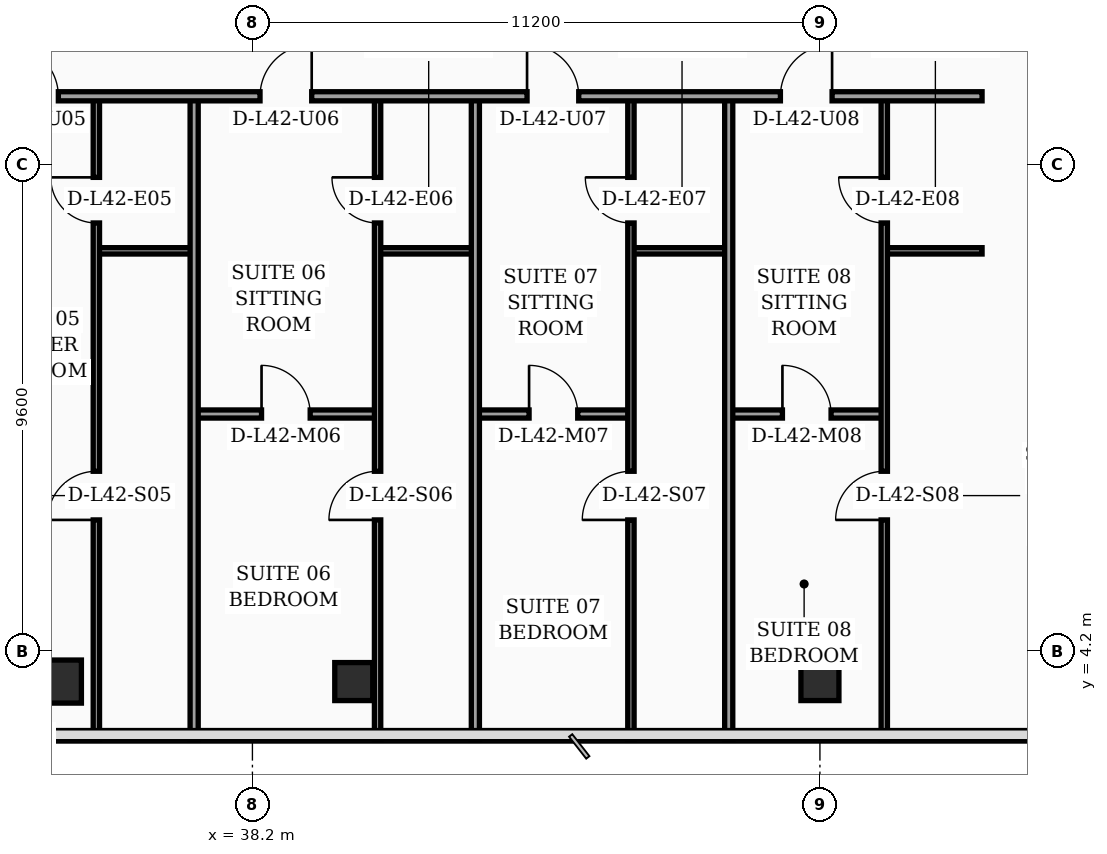
"""IFC4 building model, lengths in metres.
Left out: names, types, materials, properties, quantities, classifications, styles, units other than length and angle.
Written with IfcOpenShell. Run it as: python <this file> out.ifc"""

import sys

from ifc_helpers import new_model, si_unit, direction, frame, frame_2d, origin, origin_2d, place, context, subcontext, project, spatial, rectangle, hollow_rectangle, extrude, element, fill, save


model = new_model("IFC4")
c1 = context("Model", 3, precision=1e-05, world=origin(), true_north=direction((0.0, 1.0)))
c2 = subcontext(c1, "Body", "Model", "MODEL_VIEW")
j1 = project(units=[si_unit("LENGTHUNIT", "METRE"), si_unit("PLANEANGLEUNIT", "RADIAN")], contexts=[c1])
p1 = place(None, origin())
s1 = spatial("IfcSite", under=j1, at=p1, CompositionType="ELEMENT")
p2 = place(p1, origin())
s2 = spatial("IfcBuilding", under=s1, at=p2, CompositionType="ELEMENT")
p3 = place(p2, frame((0.0, 0.0, 171.3)))
s3 = spatial("IfcBuildingStorey", under=s2, at=p3, CompositionType="ELEMENT", Elevation=171.3)
p4 = place(p3, frame((34.4, 3.6, 0.0), z_axis=(0.0, 0.0, 1.0), x_axis=(1.0, 0.0, 0.0)))
e1 = element("IfcColumn", 1, at=p4, inside=s3, PredefinedType="COLUMN", context=c2, shape_type="SweptSolid", body=[
    extrude(hollow_rectangle(XDim=0.85, YDim=0.85, WallThickness=0.036, at=origin_2d()), origin(), (0.0, 0.0, 1.0), 3.56),
])
for number, where, z_axis, x_axis in (
    (2, (40.2, 3.6, 0.0), (0.0, 0.0, 1.0), (1.0, 0.0, 0.0)),
    (3, (49.4, 3.6, 0.0), (0.0, 0.0, 1.0), (1.0, 0.0, 0.0)),
):
    element("IfcColumn", number, at=place(p3, frame(where, z_axis=z_axis, x_axis=x_axis)), inside=s3, PredefinedType="COLUMN", context=c2, shape_type="SweptSolid", body=[
        extrude(hollow_rectangle(XDim=0.75, YDim=0.75, WallThickness=0.032, at=origin_2d()), origin(), (0.0, 0.0, 1.0), 3.56),
    ])
p5 = place(p3, frame((59.23, 5.505, 0.0), z_axis=(0.0, 0.0, 1.0), x_axis=(-0.300509063924, 0.953778958931, 0.0)))
e4 = element("IfcWall", 4, at=p5, inside=s3, PredefinedType="SOLIDWALL", context=c2, shape_type="SweptSolid", body=[
    extrude(rectangle(XDim=30.814, YDim=0.32, at=frame_2d((15.407, 0.0))), origin(), (0.0, 0.0, 1.0), 3.56),
])
p6 = place(p5, frame((4.747, 0.0, 0.0)))
e5 = element("IfcOpeningElement", 5, at=p6, cuts=e4, PredefinedType="OPENING", context=c2, shape_type="SweptSolid", body=[
    extrude(rectangle(XDim=1.4, YDim=2.25, at=frame_2d((0.7, 1.125))), frame((0.0, 0.17, 0.0), z_axis=(0.0, -1.0, 0.0), x_axis=(1.0, 0.0, 0.0)), (0.0, 0.0, 1.0), 0.34),
])
p7 = place(p5, frame((1.6, 0.0, 0.75)))
e6 = element("IfcOpeningElement", 6, at=p7, cuts=e4, PredefinedType="OPENING", context=c2, shape_type="SweptSolid", body=[
    extrude(rectangle(XDim=1.5, YDim=1.6, at=frame_2d((0.75, 0.8))), frame((0.0, 0.17, 0.0), z_axis=(0.0, -1.0, 0.0), x_axis=(1.0, 0.0, 0.0)), (0.0, 0.0, 1.0), 0.34),
])
p8 = place(p5, frame((7.8, 0.0, 0.75)))
e7 = element("IfcOpeningElement", 7, at=p8, cuts=e4, PredefinedType="OPENING", context=c2, shape_type="SweptSolid", body=[
    extrude(rectangle(XDim=1.5, YDim=1.6, at=frame_2d((0.75, 0.8))), frame((0.0, 0.17, 0.0), z_axis=(0.0, -1.0, 0.0), x_axis=(1.0, 0.0, 0.0)), (0.0, 0.0, 1.0), 0.34),
])
p9 = place(p5, frame((10.9, 0.0, 0.75)))
e8 = element("IfcOpeningElement", 8, at=p9, cuts=e4, PredefinedType="OPENING", context=c2, shape_type="SweptSolid", body=[
    extrude(rectangle(XDim=1.5, YDim=1.6, at=frame_2d((0.75, 0.8))), frame((0.0, 0.17, 0.0), z_axis=(0.0, -1.0, 0.0), x_axis=(1.0, 0.0, 0.0)), (0.0, 0.0, 1.0), 0.34),
])
p10 = place(p5, frame((14.0, 0.0, 0.75)))
e9 = element("IfcOpeningElement", 9, at=p10, cuts=e4, PredefinedType="OPENING", context=c2, shape_type="SweptSolid", body=[
    extrude(rectangle(XDim=1.5, YDim=1.6, at=frame_2d((0.75, 0.8))), frame((0.0, 0.17, 0.0), z_axis=(0.0, -1.0, 0.0), x_axis=(1.0, 0.0, 0.0)), (0.0, 0.0, 1.0), 0.34),
])
p11 = place(p5, frame((17.1, 0.0, 0.75)))
e10 = element("IfcOpeningElement", 10, at=p11, cuts=e4, PredefinedType="OPENING", context=c2, shape_type="SweptSolid", body=[
    extrude(rectangle(XDim=1.5, YDim=1.6, at=frame_2d((0.75, 0.8))), frame((0.0, 0.17, 0.0), z_axis=(0.0, -1.0, 0.0), x_axis=(1.0, 0.0, 0.0)), (0.0, 0.0, 1.0), 0.34),
])
p12 = place(p5, frame((20.2, 0.0, 0.75)))
e11 = element("IfcOpeningElement", 11, at=p12, cuts=e4, PredefinedType="OPENING", context=c2, shape_type="SweptSolid", body=[
    extrude(rectangle(XDim=1.5, YDim=1.6, at=frame_2d((0.75, 0.8))), frame((0.0, 0.17, 0.0), z_axis=(0.0, -1.0, 0.0), x_axis=(1.0, 0.0, 0.0)), (0.0, 0.0, 1.0), 0.34),
])
p13 = place(p5, frame((23.3, 0.0, 0.75)))
e12 = element("IfcOpeningElement", 12, at=p13, cuts=e4, PredefinedType="OPENING", context=c2, shape_type="SweptSolid", body=[
    extrude(rectangle(XDim=1.5, YDim=1.6, at=frame_2d((0.75, 0.8))), frame((0.0, 0.17, 0.0), z_axis=(0.0, -1.0, 0.0), x_axis=(1.0, 0.0, 0.0)), (0.0, 0.0, 1.0), 0.34),
])
p14 = place(p5, frame((26.4, 0.0, 0.75)))
e13 = element("IfcOpeningElement", 13, at=p14, cuts=e4, PredefinedType="OPENING", context=c2, shape_type="SweptSolid", body=[
    extrude(rectangle(XDim=1.5, YDim=1.6, at=frame_2d((0.75, 0.8))), frame((0.0, 0.17, 0.0), z_axis=(0.0, -1.0, 0.0), x_axis=(1.0, 0.0, 0.0)), (0.0, 0.0, 1.0), 0.34),
])
p15 = place(p3, frame((35.12, 12.1, 0.0), z_axis=(0.0, 0.0, 1.0), x_axis=(1.0, 0.0, 0.0)))
e14 = element("IfcWall", 14, at=p15, inside=s3, PredefinedType="PARTITIONING", context=c2, shape_type="SweptSolid", body=[
    extrude(rectangle(XDim=1.93, YDim=0.125, at=frame_2d((0.965, 0.0))), origin(), (0.0, 0.0, 1.0), 3.56),
])
p16 = place(p3, frame((35.12, 2.44, 0.0), z_axis=(0.0, 0.0, 1.0), x_axis=(0.0, 1.0, 0.0)))
e15 = element("IfcWall", 15, at=p16, inside=s3, PredefinedType="PARTITIONING", context=c2, shape_type="SweptSolid", body=[
    extrude(rectangle(XDim=12.71, YDim=0.125, at=frame_2d((6.355, 0.0))), origin(), (0.0, 0.0, 1.0), 2.94),
])
p17 = place(p16, frame((4.35, 0.0, 0.0)))
e16 = element("IfcOpeningElement", 16, at=p17, cuts=e15, PredefinedType="OPENING", context=c2, shape_type="SweptSolid", body=[
    extrude(rectangle(XDim=0.96, YDim=2.2, at=frame_2d((0.48, 1.1))), frame((0.0, 0.073, 0.0), z_axis=(0.0, -1.0, 0.0), x_axis=(1.0, 0.0, 0.0)), (0.0, 0.0, 1.0), 0.145),
])
p18 = place(p16, frame((10.21, 0.0, 0.0)))
e17 = element("IfcOpeningElement", 17, at=p18, cuts=e15, PredefinedType="OPENING", context=c2, shape_type="SweptSolid", body=[
    extrude(rectangle(XDim=0.9, YDim=2.15, at=frame_2d((0.45, 1.075))), frame((0.0, 0.073, 0.0), z_axis=(0.0, -1.0, 0.0), x_axis=(1.0, 0.0, 0.0)), (0.0, 0.0, 1.0), 0.145),
])
p19 = place(p3, frame((40.67, 12.1, 0.0), z_axis=(0.0, 0.0, 1.0), x_axis=(1.0, 0.0, 0.0)))
e18 = element("IfcWall", 18, at=p19, inside=s3, PredefinedType="PARTITIONING", context=c2, shape_type="SweptSolid", body=[
    extrude(rectangle(XDim=1.93, YDim=0.125, at=frame_2d((0.965, 0.0))), origin(), (0.0, 0.0, 1.0), 3.56),
])
p20 = place(p3, frame((37.05, 8.88, 0.0), z_axis=(0.0, 0.0, 1.0), x_axis=(1.0, 0.0, 0.0)))
e19 = element("IfcWall", 19, at=p20, inside=s3, PredefinedType="PARTITIONING", context=c2, shape_type="SweptSolid", body=[
    extrude(rectangle(XDim=3.62, YDim=0.16, at=frame_2d((1.81, 0.0))), origin(), (0.0, 0.0, 1.0), 2.94),
])
p21 = place(p20, frame((1.33, 0.0, 0.0)))
e20 = element("IfcOpeningElement", 20, at=p21, cuts=e19, PredefinedType="OPENING", context=c2, shape_type="SweptSolid", body=[
    extrude(rectangle(XDim=0.96, YDim=2.2, at=frame_2d((0.48, 1.1))), frame((0.0, 0.09, 0.0), z_axis=(0.0, -1.0, 0.0), x_axis=(1.0, 0.0, 0.0)), (0.0, 0.0, 1.0), 0.18),
])
p22 = place(p3, frame((40.67, 2.44, 0.0), z_axis=(0.0, 0.0, 1.0), x_axis=(0.0, 1.0, 0.0)))
e21 = element("IfcWall", 21, at=p22, inside=s3, PredefinedType="PARTITIONING", context=c2, shape_type="SweptSolid", body=[
    extrude(rectangle(XDim=12.71, YDim=0.125, at=frame_2d((6.355, 0.0))), origin(), (0.0, 0.0, 1.0), 2.94),
])
p23 = place(p22, frame((4.35, 0.0, 0.0)))
e22 = element("IfcOpeningElement", 22, at=p23, cuts=e21, PredefinedType="OPENING", context=c2, shape_type="SweptSolid", body=[
    extrude(rectangle(XDim=0.96, YDim=2.2, at=frame_2d((0.48, 1.1))), frame((0.0, 0.073, 0.0), z_axis=(0.0, -1.0, 0.0), x_axis=(1.0, 0.0, 0.0)), (0.0, 0.0, 1.0), 0.145),
])
p24 = place(p22, frame((10.21, 0.0, 0.0)))
e23 = element("IfcOpeningElement", 23, at=p24, cuts=e21, PredefinedType="OPENING", context=c2, shape_type="SweptSolid", body=[
    extrude(rectangle(XDim=0.9, YDim=2.15, at=frame_2d((0.45, 1.075))), frame((0.0, 0.073, 0.0), z_axis=(0.0, -1.0, 0.0), x_axis=(1.0, 0.0, 0.0)), (0.0, 0.0, 1.0), 0.145),
])
p25 = place(p3, frame((37.05, 2.44, 0.0), z_axis=(0.0, 0.0, 1.0), x_axis=(0.0, 1.0, 0.0)))
e24 = element("IfcWall", 24, at=p25, inside=s3, PredefinedType="PARTITIONING", context=c2, shape_type="SweptSolid", body=[
    extrude(rectangle(XDim=12.71, YDim=0.16, at=frame_2d((6.355, 0.0))), origin(), (0.0, 0.0, 1.0), 2.94),
])
p26 = place(p3, frame((45.67, 12.1, 0.0), z_axis=(0.0, 0.0, 1.0), x_axis=(1.0, 0.0, 0.0)))
e25 = element("IfcWall", 25, at=p26, inside=s3, PredefinedType="PARTITIONING", context=c2, shape_type="SweptSolid", body=[
    extrude(rectangle(XDim=1.93, YDim=0.125, at=frame_2d((0.965, 0.0))), origin(), (0.0, 0.0, 1.0), 2.94),
])
p27 = place(p3, frame((42.6, 8.88, 0.0), z_axis=(0.0, 0.0, 1.0), x_axis=(1.0, 0.0, 0.0)))
e26 = element("IfcWall", 26, at=p27, inside=s3, PredefinedType="PARTITIONING", context=c2, shape_type="SweptSolid", body=[
    extrude(rectangle(XDim=3.07, YDim=0.16, at=frame_2d((1.535, 0.0))), origin(), (0.0, 0.0, 1.0), 3.56),
])
p28 = place(p27, frame((1.06, 0.0, 0.0)))
e27 = element("IfcOpeningElement", 27, at=p28, cuts=e26, PredefinedType="OPENING", context=c2, shape_type="SweptSolid", body=[
    extrude(rectangle(XDim=0.96, YDim=2.2, at=frame_2d((0.48, 1.1))), frame((0.0, 0.09, 0.0), z_axis=(0.0, -1.0, 0.0), x_axis=(1.0, 0.0, 0.0)), (0.0, 0.0, 1.0), 0.18),
])
p29 = place(p3, frame((45.67, 2.44, 0.0), z_axis=(0.0, 0.0, 1.0), x_axis=(0.0, 1.0, 0.0)))
e28 = element("IfcWall", 28, at=p29, inside=s3, PredefinedType="PARTITIONING", context=c2, shape_type="SweptSolid", body=[
    extrude(rectangle(XDim=12.71, YDim=0.125, at=frame_2d((6.355, 0.0))), origin(), (0.0, 0.0, 1.0), 3.04),
])
p30 = place(p29, frame((4.35, 0.0, 0.0)))
e29 = element("IfcOpeningElement", 29, at=p30, cuts=e28, PredefinedType="OPENING", context=c2, shape_type="SweptSolid", body=[
    extrude(rectangle(XDim=0.96, YDim=2.2, at=frame_2d((0.48, 1.1))), frame((0.0, 0.073, 0.0), z_axis=(0.0, -1.0, 0.0), x_axis=(1.0, 0.0, 0.0)), (0.0, 0.0, 1.0), 0.145),
])
p31 = place(p29, frame((10.21, 0.0, 0.0)))
e30 = element("IfcOpeningElement", 30, at=p31, cuts=e28, PredefinedType="OPENING", context=c2, shape_type="SweptSolid", body=[
    extrude(rectangle(XDim=0.9, YDim=2.15, at=frame_2d((0.45, 1.075))), frame((0.0, 0.073, 0.0), z_axis=(0.0, -1.0, 0.0), x_axis=(1.0, 0.0, 0.0)), (0.0, 0.0, 1.0), 0.145),
])
p32 = place(p3, frame((42.6, 2.44, 0.0), z_axis=(0.0, 0.0, 1.0), x_axis=(0.0, 1.0, 0.0)))
e31 = element("IfcWall", 31, at=p32, inside=s3, PredefinedType="PARTITIONING", context=c2, shape_type="SweptSolid", body=[
    extrude(rectangle(XDim=12.71, YDim=0.16, at=frame_2d((6.355, 0.0))), origin(), (0.0, 0.0, 1.0), 3.04),
])
p33 = place(p3, frame((50.67, 12.1, 0.0), z_axis=(0.0, 0.0, 1.0), x_axis=(1.0, 0.0, 0.0)))
e32 = element("IfcWall", 32, at=p33, inside=s3, PredefinedType="PARTITIONING", context=c2, shape_type="SweptSolid", body=[
    extrude(rectangle(XDim=1.93, YDim=0.125, at=frame_2d((0.965, 0.0))), origin(), (0.0, 0.0, 1.0), 3.56),
])
p34 = place(p3, frame((47.6, 8.88, 0.0), z_axis=(0.0, 0.0, 1.0), x_axis=(1.0, 0.0, 0.0)))
e33 = element("IfcWall", 33, at=p34, inside=s3, PredefinedType="PARTITIONING", context=c2, shape_type="SweptSolid", body=[
    extrude(rectangle(XDim=3.07, YDim=0.16, at=frame_2d((1.535, 0.0))), origin(), (0.0, 0.0, 1.0), 2.94),
])
p35 = place(p34, frame((1.06, 0.0, 0.0)))
e34 = element("IfcOpeningElement", 34, at=p35, cuts=e33, PredefinedType="OPENING", context=c2, shape_type="SweptSolid", body=[
    extrude(rectangle(XDim=0.96, YDim=2.2, at=frame_2d((0.48, 1.1))), frame((0.0, 0.09, 0.0), z_axis=(0.0, -1.0, 0.0), x_axis=(1.0, 0.0, 0.0)), (0.0, 0.0, 1.0), 0.18),
])
p36 = place(p3, frame((50.67, 2.44, 0.0), z_axis=(0.0, 0.0, 1.0), x_axis=(0.0, 1.0, 0.0)))
e35 = element("IfcWall", 35, at=p36, inside=s3, PredefinedType="PARTITIONING", context=c2, shape_type="SweptSolid", body=[
    extrude(rectangle(XDim=12.71, YDim=0.125, at=frame_2d((6.355, 0.0))), origin(), (0.0, 0.0, 1.0), 3.04),
])
p37 = place(p36, frame((4.35, 0.0, 0.0)))
e36 = element("IfcOpeningElement", 36, at=p37, cuts=e35, PredefinedType="OPENING", context=c2, shape_type="SweptSolid", body=[
    extrude(rectangle(XDim=0.96, YDim=2.2, at=frame_2d((0.48, 1.1))), frame((0.0, 0.073, 0.0), z_axis=(0.0, -1.0, 0.0), x_axis=(1.0, 0.0, 0.0)), (0.0, 0.0, 1.0), 0.145),
])
p38 = place(p36, frame((10.21, 0.0, 0.0)))
e37 = element("IfcOpeningElement", 37, at=p38, cuts=e35, PredefinedType="OPENING", context=c2, shape_type="SweptSolid", body=[
    extrude(rectangle(XDim=0.9, YDim=2.15, at=frame_2d((0.45, 1.075))), frame((0.0, 0.073, 0.0), z_axis=(0.0, -1.0, 0.0), x_axis=(1.0, 0.0, 0.0)), (0.0, 0.0, 1.0), 0.145),
])
p39 = place(p3, frame((47.6, 2.44, 0.0), z_axis=(0.0, 0.0, 1.0), x_axis=(0.0, 1.0, 0.0)))
e38 = element("IfcWall", 38, at=p39, inside=s3, PredefinedType="PARTITIONING", context=c2, shape_type="SweptSolid", body=[
    extrude(rectangle(XDim=12.71, YDim=0.16, at=frame_2d((6.355, 0.0))), origin(), (0.0, 0.0, 1.0), 2.94),
])
p40 = place(p3, frame((32.4, 15.15, 0.0), z_axis=(0.0, 0.0, 1.0), x_axis=(1.0, 0.0, 0.0)))
e39 = element("IfcWall", 39, at=p40, inside=s3, PredefinedType="PARTITIONING", context=c2, shape_type="SweptSolid", body=[
    extrude(rectangle(XDim=20.2, YDim=0.18, at=frame_2d((10.1, 0.0))), origin(), (0.0, 0.0, 1.0), 2.94),
])
p41 = place(p40, frame((0.95, 0.0, 0.0)))
e40 = element("IfcOpeningElement", 40, at=p41, cuts=e39, PredefinedType="OPENING", context=c2, shape_type="SweptSolid", body=[
    extrude(rectangle(XDim=1.02, YDim=2.2, at=frame_2d((0.51, 1.1))), frame((0.0, 0.1, 0.0), z_axis=(0.0, -1.0, 0.0), x_axis=(1.0, 0.0, 0.0)), (0.0, 0.0, 1.0), 0.2),
])
p42 = place(p40, frame((5.95, 0.0, 0.0)))
e41 = element("IfcOpeningElement", 41, at=p42, cuts=e39, PredefinedType="OPENING", context=c2, shape_type="SweptSolid", body=[
    extrude(rectangle(XDim=1.02, YDim=2.2, at=frame_2d((0.51, 1.1))), frame((0.0, 0.1, 0.0), z_axis=(0.0, -1.0, 0.0), x_axis=(1.0, 0.0, 0.0)), (0.0, 0.0, 1.0), 0.2),
])
p43 = place(p40, frame((11.22, 0.0, 0.0)))
e42 = element("IfcOpeningElement", 42, at=p43, cuts=e39, PredefinedType="OPENING", context=c2, shape_type="SweptSolid", body=[
    extrude(rectangle(XDim=1.02, YDim=2.2, at=frame_2d((0.51, 1.1))), frame((0.0, 0.1, 0.0), z_axis=(0.0, -1.0, 0.0), x_axis=(1.0, 0.0, 0.0)), (0.0, 0.0, 1.0), 0.2),
])
p44 = place(p40, frame((16.22, 0.0, 0.0)))
e43 = element("IfcOpeningElement", 43, at=p44, cuts=e39, PredefinedType="OPENING", context=c2, shape_type="SweptSolid", body=[
    extrude(rectangle(XDim=1.02, YDim=2.2, at=frame_2d((0.51, 1.1))), frame((0.0, 0.1, 0.0), z_axis=(0.0, -1.0, 0.0), x_axis=(1.0, 0.0, 0.0)), (0.0, 0.0, 1.0), 0.2),
])
p45 = place(p17, origin())
e44 = element("IfcDoor", 44, at=p45, inside=s3, OperationType="SINGLE_SWING_LEFT", PredefinedType="DOOR", context=c2, shape_type="SweptSolid", body=[
    extrude(rectangle(XDim=0.96, YDim=2.2, at=frame_2d((0.48, 1.1))), frame((0.0, 0.025, 0.0), z_axis=(0.0, -1.0, 0.0), x_axis=(1.0, 0.0, 0.0)), (0.0, 0.0, 1.0), 0.05),
])
fill(e16, e44)
p46 = place(p18, origin())
e45 = element("IfcDoor", 45, at=p46, inside=s3, OperationType="SINGLE_SWING_RIGHT", PredefinedType="DOOR", context=c2, shape_type="SweptSolid", body=[
    extrude(rectangle(XDim=0.9, YDim=2.15, at=frame_2d((0.45, 1.075))), frame((0.0, 0.025, 0.0), z_axis=(0.0, -1.0, 0.0), x_axis=(1.0, 0.0, 0.0)), (0.0, 0.0, 1.0), 0.05),
])
fill(e17, e45)
p47 = place(p21, origin())
e46 = element("IfcDoor", 46, at=p47, inside=s3, OperationType="SINGLE_SWING_LEFT", PredefinedType="DOOR", context=c2, shape_type="SweptSolid", body=[
    extrude(rectangle(XDim=0.96, YDim=2.2, at=frame_2d((0.48, 1.1))), frame((0.0, 0.025, 0.0), z_axis=(0.0, -1.0, 0.0), x_axis=(1.0, 0.0, 0.0)), (0.0, 0.0, 1.0), 0.05),
])
fill(e20, e46)
p48 = place(p23, origin())
e47 = element("IfcDoor", 47, at=p48, inside=s3, OperationType="SINGLE_SWING_LEFT", PredefinedType="DOOR", context=c2, shape_type="SweptSolid", body=[
    extrude(rectangle(XDim=0.96, YDim=2.2, at=frame_2d((0.48, 1.1))), frame((0.0, 0.025, 0.0), z_axis=(0.0, -1.0, 0.0), x_axis=(1.0, 0.0, 0.0)), (0.0, 0.0, 1.0), 0.05),
])
fill(e22, e47)
p49 = place(p24, origin())
e48 = element("IfcDoor", 48, at=p49, inside=s3, OperationType="SINGLE_SWING_RIGHT", PredefinedType="DOOR", context=c2, shape_type="SweptSolid", body=[
    extrude(rectangle(XDim=0.9, YDim=2.15, at=frame_2d((0.45, 1.075))), frame((0.0, 0.025, 0.0), z_axis=(0.0, -1.0, 0.0), x_axis=(1.0, 0.0, 0.0)), (0.0, 0.0, 1.0), 0.05),
])
fill(e23, e48)
p50 = place(p28, origin())
e49 = element("IfcDoor", 49, at=p50, inside=s3, OperationType="SINGLE_SWING_LEFT", PredefinedType="DOOR", context=c2, shape_type="SweptSolid", body=[
    extrude(rectangle(XDim=0.96, YDim=2.2, at=frame_2d((0.48, 1.1))), frame((0.0, 0.025, 0.0), z_axis=(0.0, -1.0, 0.0), x_axis=(1.0, 0.0, 0.0)), (0.0, 0.0, 1.0), 0.05),
])
fill(e27, e49)
p51 = place(p30, origin())
e50 = element("IfcDoor", 50, at=p51, inside=s3, OperationType="SINGLE_SWING_LEFT", PredefinedType="DOOR", context=c2, shape_type="SweptSolid", body=[
    extrude(rectangle(XDim=0.96, YDim=2.2, at=frame_2d((0.48, 1.1))), frame((0.0, 0.025, 0.0), z_axis=(0.0, -1.0, 0.0), x_axis=(1.0, 0.0, 0.0)), (0.0, 0.0, 1.0), 0.05),
])
fill(e29, e50)
p52 = place(p31, origin())
e51 = element("IfcDoor", 51, at=p52, inside=s3, OperationType="SINGLE_SWING_RIGHT", PredefinedType="DOOR", context=c2, shape_type="SweptSolid", body=[
    extrude(rectangle(XDim=0.9, YDim=2.15, at=frame_2d((0.45, 1.075))), frame((0.0, 0.025, 0.0), z_axis=(0.0, -1.0, 0.0), x_axis=(1.0, 0.0, 0.0)), (0.0, 0.0, 1.0), 0.05),
])
fill(e30, e51)
p53 = place(p35, origin())
e52 = element("IfcDoor", 52, at=p53, inside=s3, OperationType="SINGLE_SWING_LEFT", PredefinedType="DOOR", context=c2, shape_type="SweptSolid", body=[
    extrude(rectangle(XDim=0.96, YDim=2.2, at=frame_2d((0.48, 1.1))), frame((0.0, 0.025, 0.0), z_axis=(0.0, -1.0, 0.0), x_axis=(1.0, 0.0, 0.0)), (0.0, 0.0, 1.0), 0.05),
])
fill(e34, e52)
p54 = place(p37, origin())
e53 = element("IfcDoor", 53, at=p54, inside=s3, OperationType="SINGLE_SWING_LEFT", PredefinedType="DOOR", context=c2, shape_type="SweptSolid", body=[
    extrude(rectangle(XDim=0.96, YDim=2.2, at=frame_2d((0.48, 1.1))), frame((0.0, 0.025, 0.0), z_axis=(0.0, -1.0, 0.0), x_axis=(1.0, 0.0, 0.0)), (0.0, 0.0, 1.0), 0.05),
])
fill(e36, e53)
p55 = place(p38, origin())
e54 = element("IfcDoor", 54, at=p55, inside=s3, OperationType="SINGLE_SWING_RIGHT", PredefinedType="DOOR", context=c2, shape_type="SweptSolid", body=[
    extrude(rectangle(XDim=0.9, YDim=2.15, at=frame_2d((0.45, 1.075))), frame((0.0, 0.025, 0.0), z_axis=(0.0, -1.0, 0.0), x_axis=(1.0, 0.0, 0.0)), (0.0, 0.0, 1.0), 0.05),
])
fill(e37, e54)
p56 = place(p41, origin())
e55 = element("IfcDoor", 55, at=p56, inside=s3, OperationType="SINGLE_SWING_LEFT", PredefinedType="DOOR", context=c2, shape_type="SweptSolid", body=[
    extrude(rectangle(XDim=1.02, YDim=2.2, at=frame_2d((0.51, 1.1))), frame((0.0, 0.025, 0.0), z_axis=(0.0, -1.0, 0.0), x_axis=(1.0, 0.0, 0.0)), (0.0, 0.0, 1.0), 0.05),
])
fill(e40, e55)
p57 = place(p42, origin())
e56 = element("IfcDoor", 56, at=p57, inside=s3, OperationType="SINGLE_SWING_RIGHT", PredefinedType="DOOR", context=c2, shape_type="SweptSolid", body=[
    extrude(rectangle(XDim=1.02, YDim=2.2, at=frame_2d((0.51, 1.1))), frame((0.0, 0.025, 0.0), z_axis=(0.0, -1.0, 0.0), x_axis=(1.0, 0.0, 0.0)), (0.0, 0.0, 1.0), 0.05),
])
fill(e41, e56)
p58 = place(p43, origin())
e57 = element("IfcDoor", 57, at=p58, inside=s3, OperationType="SINGLE_SWING_LEFT", PredefinedType="DOOR", context=c2, shape_type="SweptSolid", body=[
    extrude(rectangle(XDim=1.02, YDim=2.2, at=frame_2d((0.51, 1.1))), frame((0.0, 0.025, 0.0), z_axis=(0.0, -1.0, 0.0), x_axis=(1.0, 0.0, 0.0)), (0.0, 0.0, 1.0), 0.05),
])
fill(e42, e57)
p59 = place(p44, origin())
e58 = element("IfcDoor", 58, at=p59, inside=s3, OperationType="SINGLE_SWING_RIGHT", PredefinedType="DOOR", context=c2, shape_type="SweptSolid", body=[
    extrude(rectangle(XDim=1.02, YDim=2.2, at=frame_2d((0.51, 1.1))), frame((0.0, 0.025, 0.0), z_axis=(0.0, -1.0, 0.0), x_axis=(1.0, 0.0, 0.0)), (0.0, 0.0, 1.0), 0.05),
])
fill(e43, e58)
save(model, sys.argv[1])
